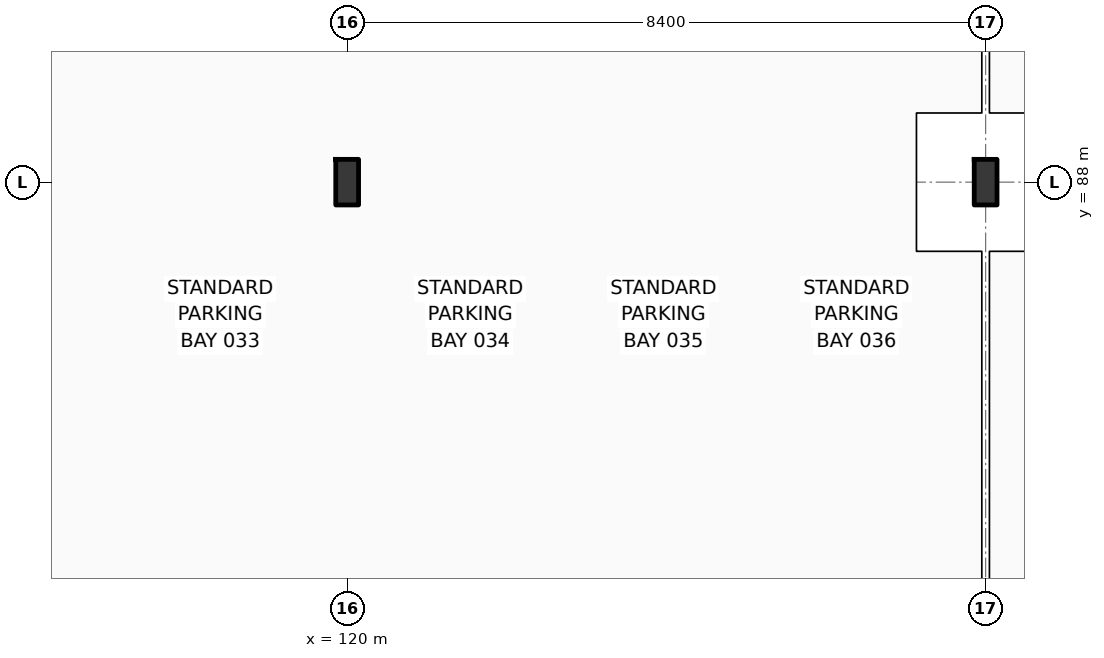
"""IFC4 building model, lengths in metres.
Left out: names, types, materials, properties, quantities, classifications, styles, units other than length and angle.
Written with IfcOpenShell. Run it as: python <this file> out.ifc"""

import sys

from ifc_helpers import new_model, si_unit, direction, frame, origin, origin_2d, place, context, subcontext, project, spatial, i_section, extrude, element, save


model = new_model("IFC4")
c1 = context("Model", 3, precision=1e-05, world=origin(), true_north=direction((0.0, 1.0)))
c2 = subcontext(c1, "Body", "Model", "MODEL_VIEW")
j1 = project(units=[si_unit("LENGTHUNIT", "METRE"), si_unit("PLANEANGLEUNIT", "RADIAN")], contexts=[c1])
p1 = place(None, origin())
s1 = spatial("IfcSite", under=j1, at=p1, CompositionType="ELEMENT")
p2 = place(p1, origin())
s2 = spatial("IfcBuilding", under=s1, at=p2, CompositionType="ELEMENT")
p3 = place(p2, frame((0.0, 0.0, -4.5)))
s3 = spatial("IfcBuildingStorey", under=s2, at=p3, CompositionType="ELEMENT", Elevation=-4.5)
for number, where, z_axis, x_axis in (
    (1, (120.0, 88.0, 0.0), (0.0, 0.0, 1.0), (1.0, 0.0, 0.0)),
    (2, (128.4, 88.0, 0.0), (0.0, 0.0, 1.0), (1.0, 0.0, 0.0)),
):
    element("IfcColumn", number, at=place(p3, frame(where, z_axis=z_axis, x_axis=x_axis)), inside=s3, PredefinedType="COLUMN", context=c2, shape_type="SweptSolid", body=[
        extrude(i_section(OverallWidth=0.3, OverallDepth=0.6, WebThickness=0.015, FlangeThickness=0.03, FilletRadius=0.027, at=origin_2d()), origin(), (0.0, 0.0, 1.0), 4.5),
    ])
save(model, sys.argv[1])
